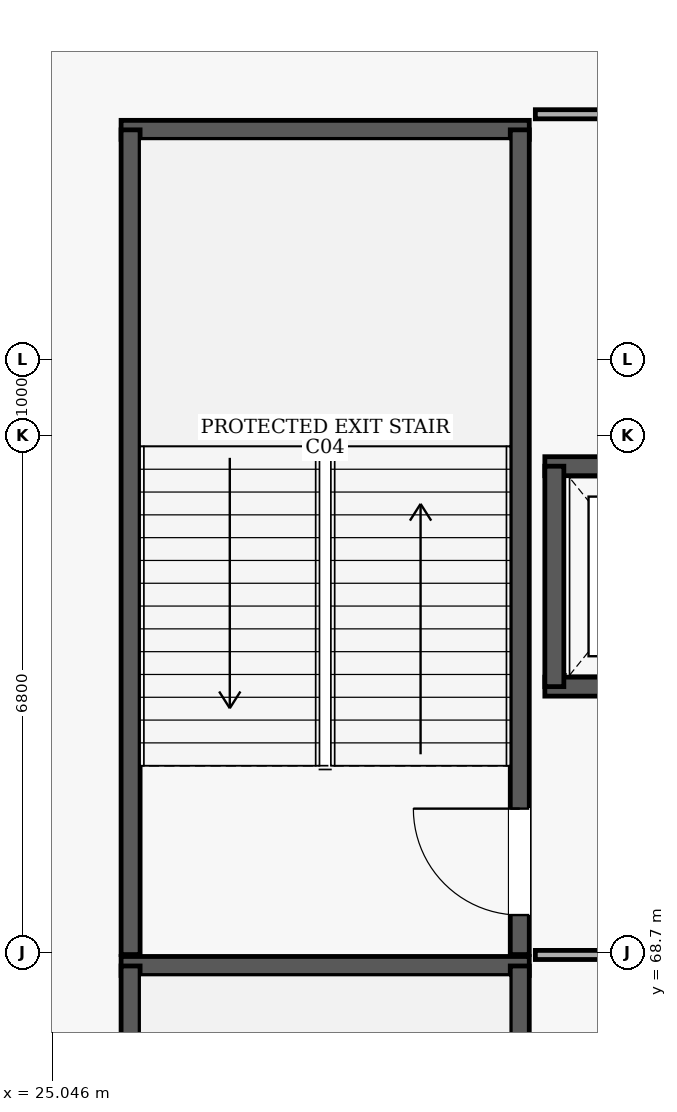
"""IFC4 building model, lengths in metres.
Left out: names, types, materials, properties, quantities, classifications, styles, units other than length and angle.
Written with IfcOpenShell. Run it as: python <this file> out.ifc"""

import sys

from ifc_helpers import new_model, si_unit, direction, frame, frame_2d, origin, place, context, subcontext, project, spatial, rectangle, extrude, element, fill, save


model = new_model("IFC4")
c1 = context("Model", 3, precision=1e-05, world=origin(), true_north=direction((0.0, 1.0)))
c2 = subcontext(c1, "Body", "Model", "MODEL_VIEW")
j1 = project(units=[si_unit("LENGTHUNIT", "METRE"), si_unit("PLANEANGLEUNIT", "RADIAN")], contexts=[c1])
p1 = place(None, origin())
s1 = spatial("IfcSite", under=j1, at=p1, CompositionType="ELEMENT")
p2 = place(p1, origin())
s2 = spatial("IfcBuilding", under=s1, at=p2, CompositionType="ELEMENT")
p3 = place(p2, frame((0.0, 0.0, 15.0)))
s3 = spatial("IfcBuildingStorey", under=s2, at=p3, CompositionType="ELEMENT", Elevation=15.0)
p4 = place(p3, frame((31.32, 68.525, 0.0), z_axis=(0.0, 0.0, 1.0), x_axis=(-1.0, 0.0, 0.0)))
e1 = element("IfcWall", 1, at=p4, inside=s3, PredefinedType="SHEAR", context=c2, shape_type="SweptSolid", body=[
    extrude(rectangle(XDim=5.37, YDim=0.25, at=frame_2d((2.685, 0.0))), origin(), (0.0, 0.0, 1.0), 4.5),
])
p5 = place(p3, frame((26.075, 57.675, 0.0), z_axis=(0.0, 0.0, 1.0), x_axis=(0.0, 1.0, 0.0)))
e2 = element("IfcWall", 2, at=p5, inside=s3, PredefinedType="SHEAR", context=c2, shape_type="SweptSolid", body=[
    extrude(rectangle(XDim=10.85, YDim=0.25, at=frame_2d((5.425, 0.0))), origin(), (0.0, 0.0, 1.0), 4.5),
])
p6 = place(p3, frame((31.195, 57.675, 0.0), z_axis=(0.0, 0.0, 1.0), x_axis=(0.0, 1.0, 0.0)))
e3 = element("IfcWall", 3, at=p6, inside=s3, PredefinedType="SHEAR", context=c2, shape_type="SweptSolid", body=[
    extrude(rectangle(XDim=10.85, YDim=0.25, at=frame_2d((5.425, 0.0))), origin(), (0.0, 0.0, 1.0), 4.5),
])
p7 = place(p6, frame((0.52, 0.0, 0.0)))
e4 = element("IfcOpeningElement", 4, at=p7, cuts=e3, PredefinedType="OPENING", context=c2, shape_type="SweptSolid", body=[
    extrude(rectangle(XDim=1.4, YDim=2.15, at=frame_2d((0.7, 1.075))), frame((0.0, 0.135, 0.0), z_axis=(0.0, -1.0, 0.0), x_axis=(1.0, 0.0, 0.0)), (0.0, 0.0, 1.0), 0.27),
])
p8 = place(p3, frame((31.32, 79.525, 0.0), z_axis=(0.0, 0.0, 1.0), x_axis=(-1.0, 0.0, 0.0)))
e5 = element("IfcWall", 5, at=p8, inside=s3, PredefinedType="SHEAR", context=c2, shape_type="SweptSolid", body=[
    extrude(rectangle(XDim=5.37, YDim=0.25, at=frame_2d((2.685, 0.0))), origin(), (0.0, 0.0, 1.0), 4.5),
])
p9 = place(p3, frame((26.075, 68.675, 0.0), z_axis=(0.0, 0.0, 1.0), x_axis=(0.0, 1.0, 0.0)))
e6 = element("IfcWall", 6, at=p9, inside=s3, PredefinedType="SHEAR", context=c2, shape_type="SweptSolid", body=[
    extrude(rectangle(XDim=10.85, YDim=0.25, at=frame_2d((5.425, 0.0))), origin(), (0.0, 0.0, 1.0), 4.5),
])
p10 = place(p3, frame((31.195, 68.675, 0.0), z_axis=(0.0, 0.0, 1.0), x_axis=(0.0, 1.0, 0.0)))
e7 = element("IfcWall", 7, at=p10, inside=s3, PredefinedType="SHEAR", context=c2, shape_type="SweptSolid", body=[
    extrude(rectangle(XDim=10.85, YDim=0.25, at=frame_2d((5.425, 0.0))), origin(), (0.0, 0.0, 1.0), 4.5),
])
p11 = place(p10, frame((0.52, 0.0, 0.0)))
e8 = element("IfcOpeningElement", 8, at=p11, cuts=e7, PredefinedType="OPENING", context=c2, shape_type="SweptSolid", body=[
    extrude(rectangle(XDim=1.4, YDim=2.15, at=frame_2d((0.7, 1.075))), frame((0.0, 0.135, 0.0), z_axis=(0.0, -1.0, 0.0), x_axis=(1.0, 0.0, 0.0)), (0.0, 0.0, 1.0), 0.27),
])
p12 = place(p3, frame((31.525, 72.2, 0.0), z_axis=(0.0, 0.0, 1.0), x_axis=(1.0, 0.0, 0.0)))
e9 = element("IfcWall", 9, at=p12, inside=s3, PredefinedType="SHEAR", context=c2, shape_type="SweptSolid", body=[
    extrude(rectangle(XDim=2.75, YDim=0.25, at=frame_2d((1.375, 0.0))), origin(), (0.0, 0.0, 1.0), 4.5),
])
p13 = place(p12, frame((0.85, 0.0, 0.0)))
e10 = element("IfcOpeningElement", 10, at=p13, cuts=e9, PredefinedType="OPENING", context=c2, shape_type="SweptSolid", body=[
    extrude(rectangle(XDim=1.05, YDim=2.15, at=frame_2d((0.525, 1.075))), frame((0.0, 0.135, 0.0), z_axis=(0.0, -1.0, 0.0), x_axis=(1.0, 0.0, 0.0)), (0.0, 0.0, 1.0), 0.27),
])
p14 = place(p3, frame((34.275, 75.1, 0.0), z_axis=(0.0, 0.0, 1.0), x_axis=(-1.0, 0.0, 0.0)))
e11 = element("IfcWall", 11, at=p14, inside=s3, PredefinedType="SHEAR", context=c2, shape_type="SweptSolid", body=[
    extrude(rectangle(XDim=2.75, YDim=0.25, at=frame_2d((1.375, 0.0))), origin(), (0.0, 0.0, 1.0), 4.5),
])
p15 = place(p3, frame((31.65, 75.1, 0.0), z_axis=(0.0, 0.0, 1.0), x_axis=(0.0, -1.0, 0.0)))
e12 = element("IfcWall", 12, at=p15, inside=s3, PredefinedType="SHEAR", context=c2, shape_type="SweptSolid", body=[
    extrude(rectangle(XDim=2.9, YDim=0.25, at=frame_2d((1.45, 0.0))), origin(), (0.0, 0.0, 1.0), 4.5),
])
p16 = place(p3, frame((37.2, 68.67, 0.0), z_axis=(0.0, 0.0, 1.0), x_axis=(-1.0, 0.0, 0.0)))
e13 = element("IfcWall", 13, at=p16, inside=s3, PredefinedType="PARTITIONING", context=c2, shape_type="SweptSolid", body=[
    extrude(rectangle(XDim=5.8, YDim=0.12, at=frame_2d((2.9, 0.0))), origin(), (0.0, 0.0, 1.0), 3.68),
])
p17 = place(p16, frame((3.671, 0.0, 0.0)))
e14 = element("IfcOpeningElement", 14, at=p17, cuts=e13, PredefinedType="OPENING", context=c2, shape_type="SweptSolid", body=[
    extrude(rectangle(XDim=1.05, YDim=2.15, at=frame_2d((0.525, 1.075))), frame((0.0, 0.07, 0.0), z_axis=(0.0, -1.0, 0.0), x_axis=(1.0, 0.0, 0.0)), (0.0, 0.0, 1.0), 0.14),
])
p18 = place(p3, frame((37.2, 79.73, 0.0), z_axis=(0.0, 0.0, 1.0), x_axis=(-1.0, 0.0, 0.0)))
e15 = element("IfcWall", 15, at=p18, inside=s3, PredefinedType="PARTITIONING", context=c2, shape_type="SweptSolid", body=[
    extrude(rectangle(XDim=5.8, YDim=0.12, at=frame_2d((2.9, 0.0))), origin(), (0.0, 0.0, 1.0), 4.5),
])
p19 = place(p11, origin())
e16 = element("IfcDoor", 16, at=p19, inside=s3, OperationType="SINGLE_SWING_RIGHT", PredefinedType="DOOR", context=c2, shape_type="SweptSolid", body=[
    extrude(rectangle(XDim=1.4, YDim=2.15, at=frame_2d((0.7, 1.075))), frame((0.0, 0.025, 0.0), z_axis=(0.0, -1.0, 0.0), x_axis=(1.0, 0.0, 0.0)), (0.0, 0.0, 1.0), 0.05),
])
fill(e8, e16)
save(model, sys.argv[1])
